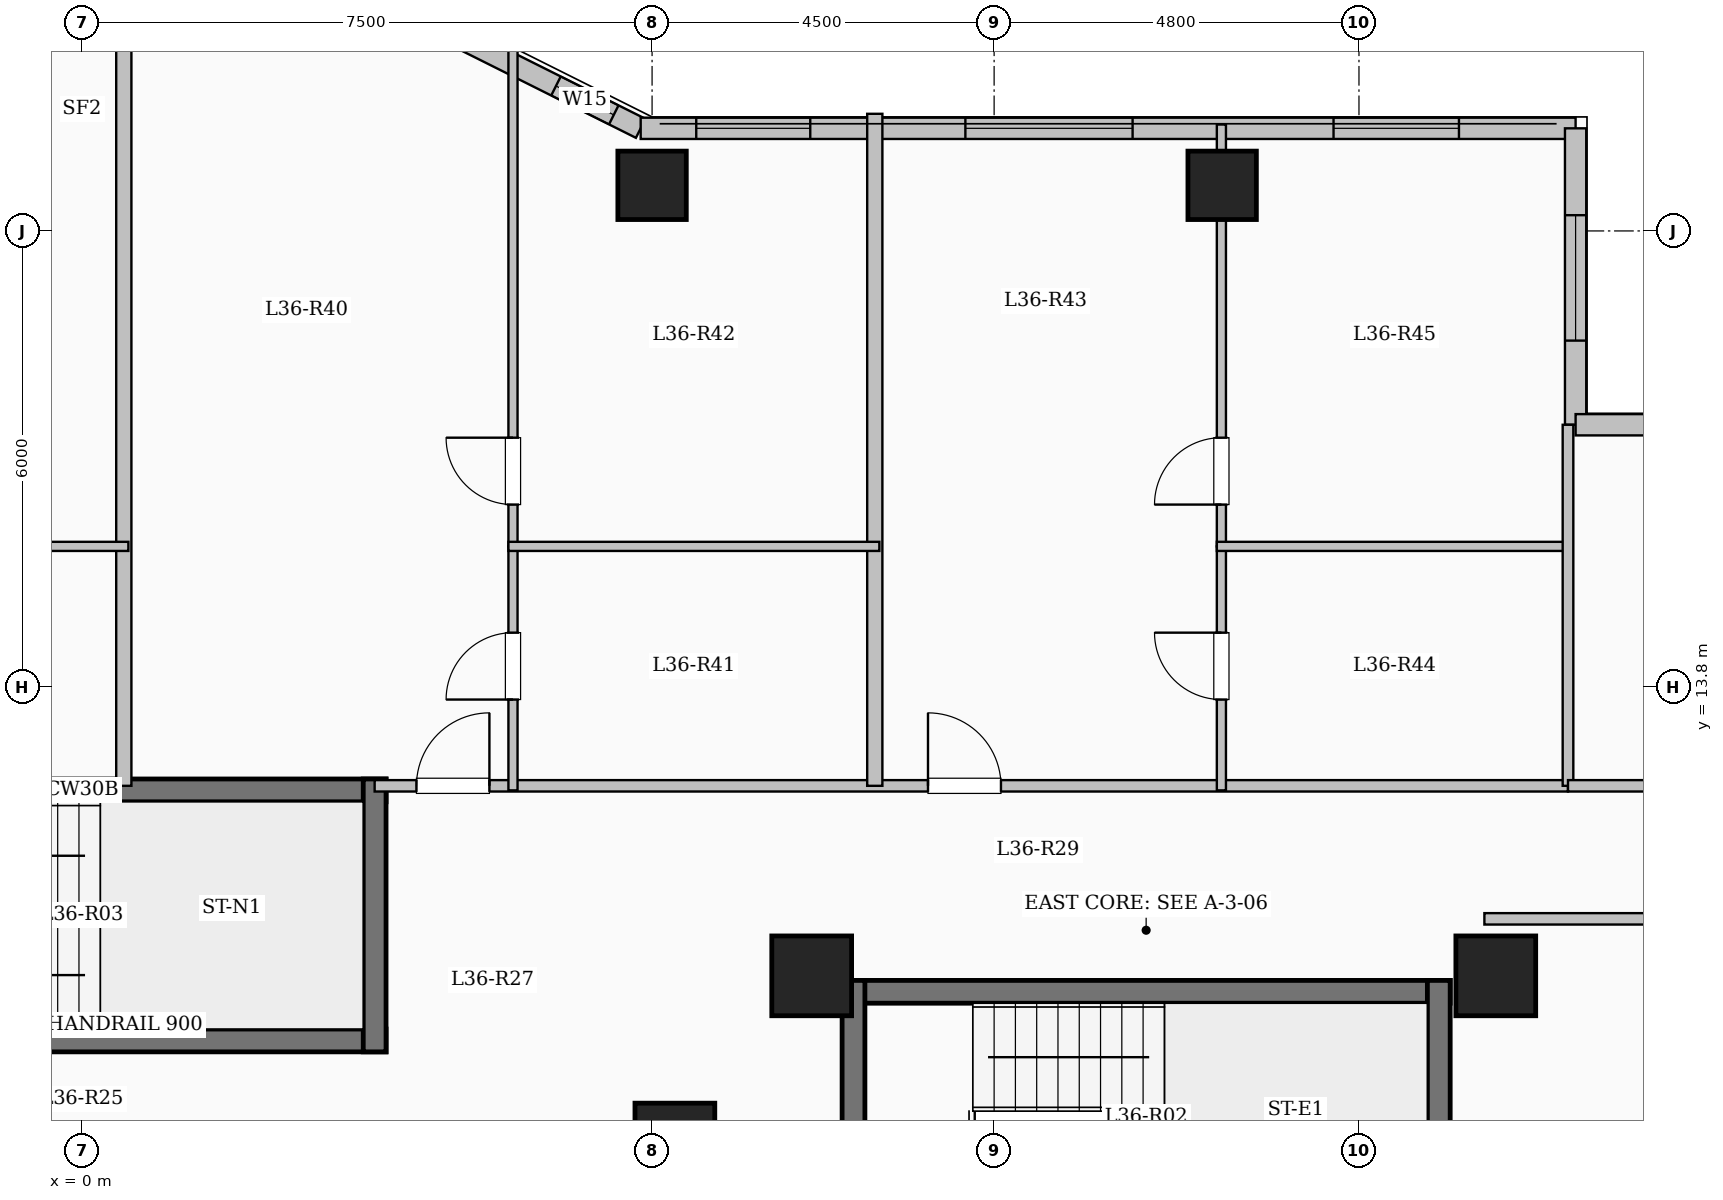
"""IFC4 building model, lengths in metres.
Left out: names, types, materials, properties, quantities, classifications, styles, units other than length and angle.
Written with IfcOpenShell. Run it as: python <this file> out.ifc"""

import sys

from ifc_helpers import new_model, si_unit, direction, frame, frame_2d, origin, origin_2d, place, context, subcontext, project, spatial, rectangle, extrude, element, fill, save


model = new_model("IFC4")
c1 = context("Model", 3, precision=1e-05, world=origin(), true_north=direction((0.0, 1.0)))
c2 = subcontext(c1, "Body", "Model", "MODEL_VIEW")
j1 = project(units=[si_unit("LENGTHUNIT", "METRE"), si_unit("PLANEANGLEUNIT", "RADIAN")], contexts=[c1])
p1 = place(None, origin())
s1 = spatial("IfcSite", under=j1, at=p1, CompositionType="ELEMENT")
p2 = place(p1, origin())
s2 = spatial("IfcBuilding", under=s1, at=p2, CompositionType="ELEMENT")
p3 = place(p2, frame((0.0, 0.0, 135.95)))
s3 = spatial("IfcBuildingStorey", under=s2, at=p3, CompositionType="ELEMENT", Elevation=135.95)
for number, where, z_axis, x_axis in (
    (1, (7.8, 7.8, 0.0), (0.0, 0.0, 1.0), (1.0, 0.0, 0.0)),
    (2, (9.6, 10.0, 0.0), (0.0, 0.0, 1.0), (1.0, 0.0, 0.0)),
    (3, (18.6, 10.0, 0.0), (0.0, 0.0, 1.0), (1.0, 0.0, 0.0)),
):
    element("IfcColumn", number, at=place(p3, frame(where, z_axis=z_axis, x_axis=x_axis)), inside=s3, PredefinedType="COLUMN", context=c2, shape_type="SweptSolid", body=[
        extrude(rectangle(XDim=1.05, YDim=1.05, at=origin_2d()), origin(), (0.0, 0.0, 1.0), 3.35),
    ])
for number, where, z_axis, x_axis in (
    (4, (7.5, 20.4, 0.0), (0.0, 0.0, 1.0), (1.0, 0.0, 0.0)),
    (5, (15.0, 20.4, 0.0), (0.0, 0.0, 1.0), (1.0, 0.0, 0.0)),
):
    element("IfcColumn", number, at=place(p3, frame(where, z_axis=z_axis, x_axis=x_axis)), inside=s3, PredefinedType="COLUMN", context=c2, shape_type="SweptSolid", body=[
        extrude(rectangle(XDim=0.9, YDim=0.9, at=origin_2d()), origin(), (0.0, 0.0, 1.0), 3.35),
    ])
p4 = place(p3, frame((4.35, 22.65, 0.0), z_axis=(0.0, 0.0, 1.0), x_axis=(0.894427191, -0.4472135955, 0.0)))
e6 = element("IfcWall", 6, at=p4, inside=s3, PredefinedType="SOLIDWALL", context=c2, shape_type="SweptSolid", body=[
    extrude(rectangle(XDim=3.354, YDim=0.28, at=frame_2d((1.677, 0.0))), origin(), (0.0, 0.0, 1.0), 3.1),
])
p5 = place(p4, frame((2.108, 0.0, 0.95)))
e7 = element("IfcOpeningElement", 7, at=p5, cuts=e6, PredefinedType="OPENING", context=c2, shape_type="SweptSolid", body=[
    extrude(rectangle(XDim=0.85, YDim=1.5, at=frame_2d((0.425, 0.75))), frame((0.0, 0.15, 0.0), z_axis=(0.0, -1.0, 0.0), x_axis=(1.0, 0.0, 0.0)), (0.0, 0.0, 1.0), 0.3),
])
p6 = place(p3, frame((7.35, 21.15, 0.0), z_axis=(0.0, 0.0, 1.0), x_axis=(1.0, 0.0, 0.0)))
e8 = element("IfcWall", 8, at=p6, inside=s3, PredefinedType="SOLIDWALL", context=c2, shape_type="SweptSolid", body=[
    extrude(rectangle(XDim=12.3, YDim=0.28, at=frame_2d((6.15, 0.0))), origin(), (0.0, 0.0, 1.0), 3.1),
])
p7 = place(p6, frame((0.731, 0.0, 0.9)))
e9 = element("IfcOpeningElement", 9, at=p7, cuts=e8, PredefinedType="OPENING", context=c2, shape_type="SweptSolid", body=[
    extrude(rectangle(XDim=1.5, YDim=1.65, at=frame_2d((0.75, 0.825))), frame((0.0, 0.15, 0.0), z_axis=(0.0, -1.0, 0.0), x_axis=(1.0, 0.0, 0.0)), (0.0, 0.0, 1.0), 0.3),
])
p8 = place(p6, frame((4.272, 0.0, 0.9)))
e10 = element("IfcOpeningElement", 10, at=p8, cuts=e8, PredefinedType="OPENING", context=c2, shape_type="SweptSolid", body=[
    extrude(rectangle(XDim=2.2, YDim=1.75, at=frame_2d((1.1, 0.875))), frame((0.0, 0.15, 0.0), z_axis=(0.0, -1.0, 0.0), x_axis=(1.0, 0.0, 0.0)), (0.0, 0.0, 1.0), 0.3),
])
p9 = place(p6, frame((9.115, 0.0, 0.9)))
e11 = element("IfcOpeningElement", 11, at=p9, cuts=e8, PredefinedType="OPENING", context=c2, shape_type="SweptSolid", body=[
    extrude(rectangle(XDim=1.65, YDim=1.6, at=frame_2d((0.825, 0.8))), frame((0.0, 0.15, 0.0), z_axis=(0.0, -1.0, 0.0), x_axis=(1.0, 0.0, 0.0)), (0.0, 0.0, 1.0), 0.3),
])
p10 = place(p3, frame((19.65, 21.15, 0.0), z_axis=(0.0, 0.0, 1.0), x_axis=(0.0, -1.0, 0.0)))
e12 = element("IfcWall", 12, at=p10, inside=s3, PredefinedType="SOLIDWALL", context=c2, shape_type="SweptSolid", body=[
    extrude(rectangle(XDim=3.9, YDim=0.28, at=frame_2d((1.95, 0.0))), origin(), (0.0, 0.0, 1.0), 3.1),
])
p11 = place(p10, frame((1.143, 0.0, 0.9)))
e13 = element("IfcOpeningElement", 13, at=p11, cuts=e12, PredefinedType="OPENING", context=c2, shape_type="SweptSolid", body=[
    extrude(rectangle(XDim=1.65, YDim=1.6, at=frame_2d((0.825, 0.8))), frame((0.0, 0.15, 0.0), z_axis=(0.0, -1.0, 0.0), x_axis=(1.0, 0.0, 0.0)), (0.0, 0.0, 1.0), 0.3),
])
p12 = place(p3, frame((19.65, 17.25, 0.0), z_axis=(0.0, 0.0, 1.0), x_axis=(1.0, 0.0, 0.0)))
e14 = element("IfcWall", 14, at=p12, inside=s3, PredefinedType="SOLIDWALL", context=c2, shape_type="SweptSolid", body=[
    extrude(rectangle(XDim=5.4, YDim=0.28, at=frame_2d((2.7, 0.0))), origin(), (0.0, 0.0, 1.0), 3.1),
])
p13 = place(p12, frame((1.675, 0.0, 0.9)))
e15 = element("IfcOpeningElement", 15, at=p13, cuts=e14, PredefinedType="OPENING", context=c2, shape_type="SweptSolid", body=[
    extrude(rectangle(XDim=2.0, YDim=1.7, at=frame_2d((1.0, 0.85))), frame((0.0, 0.15, 0.0), z_axis=(0.0, -1.0, 0.0), x_axis=(1.0, 0.0, 0.0)), (0.0, 0.0, 1.0), 0.3),
])
p14 = place(p3, frame((10.0, 9.79, 0.0), z_axis=(0.0, 0.0, 1.0), x_axis=(1.0, 0.0, 0.0)))
e16 = element("IfcWall", 16, at=p14, inside=s3, PredefinedType="SHEAR", context=c2, shape_type="SweptSolid", body=[
    extrude(rectangle(XDim=8.0, YDim=0.3, at=frame_2d((4.0, 0.0))), origin(), (0.0, 0.0, 1.0), 3.35),
])
for number, where, z_axis, x_axis in (
    (17, (10.15, 6.35, 0.0), (0.0, 0.0, 1.0), (0.0, 1.0, 0.0)),
    (18, (17.85, 6.35, 0.0), (0.0, 0.0, 1.0), (0.0, 1.0, 0.0)),
):
    element("IfcWall", number, at=place(p3, frame(where, z_axis=z_axis, x_axis=x_axis)), inside=s3, PredefinedType="SHEAR", context=c2, shape_type="SweptSolid", body=[
        extrude(rectangle(XDim=3.59, YDim=0.3, at=frame_2d((1.795, 0.0))), origin(), (0.0, 0.0, 1.0), 3.35),
    ])
p15 = place(p3, frame((-4.0, 12.44, 0.0), z_axis=(0.0, 0.0, 1.0), x_axis=(1.0, 0.0, 0.0)))
e19 = element("IfcWall", 19, at=p15, inside=s3, PredefinedType="SHEAR", context=c2, shape_type="SweptSolid", body=[
    extrude(rectangle(XDim=8.0, YDim=0.3, at=frame_2d((4.0, 0.0))), origin(), (0.0, 0.0, 1.0), 3.35),
])
p16 = place(p3, frame((-4.0, 9.15, 0.0), z_axis=(0.0, 0.0, 1.0), x_axis=(1.0, 0.0, 0.0)))
e20 = element("IfcWall", 20, at=p16, inside=s3, PredefinedType="SHEAR", context=c2, shape_type="SweptSolid", body=[
    extrude(rectangle(XDim=8.0, YDim=0.3, at=frame_2d((4.0, 0.0))), origin(), (0.0, 0.0, 1.0), 3.35),
])
p17 = place(p16, frame((0.55, 0.0, 0.0)))
e21 = element("IfcOpeningElement", 21, at=p17, cuts=e20, PredefinedType="OPENING", context=c2, shape_type="SweptSolid", body=[
    extrude(rectangle(XDim=1.0, YDim=2.15, at=frame_2d((0.5, 1.075))), frame((0.0, 0.16, 0.0), z_axis=(0.0, -1.0, 0.0), x_axis=(1.0, 0.0, 0.0)), (0.0, 0.0, 1.0), 0.32),
])
p18 = place(p3, frame((3.85, 9.0, 0.0), z_axis=(0.0, 0.0, 1.0), x_axis=(0.0, 1.0, 0.0)))
e22 = element("IfcWall", 22, at=p18, inside=s3, PredefinedType="SHEAR", context=c2, shape_type="SweptSolid", body=[
    extrude(rectangle(XDim=3.59, YDim=0.3, at=frame_2d((1.795, 0.0))), origin(), (0.0, 0.0, 1.0), 3.35),
])
p19 = place(p3, frame((3.85, 12.5, 0.0), z_axis=(0.0, 0.0, 1.0), x_axis=(1.0, 0.0, 0.0)))
e23 = element("IfcWall", 23, at=p19, inside=s3, PredefinedType="PARTITIONING", context=c2, shape_type="SweptSolid", body=[
    extrude(rectangle(XDim=15.7, YDim=0.15, at=frame_2d((7.85, 0.0))), origin(), (0.0, 0.0, 1.0), 3.1),
])
p20 = place(p19, frame((0.55, 0.0, 0.0)))
e24 = element("IfcOpeningElement", 24, at=p20, cuts=e23, PredefinedType="OPENING", context=c2, shape_type="SweptSolid", body=[
    extrude(rectangle(XDim=0.96, YDim=2.15, at=frame_2d((0.48, 1.075))), frame((0.0, 0.085, 0.0), z_axis=(0.0, -1.0, 0.0), x_axis=(1.0, 0.0, 0.0)), (0.0, 0.0, 1.0), 0.17),
])
p21 = place(p19, frame((7.28, 0.0, 0.0)))
e25 = element("IfcOpeningElement", 25, at=p21, cuts=e23, PredefinedType="OPENING", context=c2, shape_type="SweptSolid", body=[
    extrude(rectangle(XDim=0.96, YDim=2.15, at=frame_2d((0.48, 1.075))), frame((0.0, 0.085, 0.0), z_axis=(0.0, -1.0, 0.0), x_axis=(1.0, 0.0, 0.0)), (0.0, 0.0, 1.0), 0.17),
])
p22 = place(p3, frame((0.55, 12.5, 0.0), z_axis=(0.0, 0.0, 1.0), x_axis=(0.0, 1.0, 0.0)))
e26 = element("IfcWall", 26, at=p22, inside=s3, PredefinedType="SOLIDWALL", context=c2, shape_type="SweptSolid", body=[
    extrude(rectangle(XDim=10.18, YDim=0.2, at=frame_2d((5.09, 0.0))), origin(), (0.0, 0.0, 1.0), 3.1),
])
p23 = place(p3, frame((-4.27, 15.65, 0.0), z_axis=(0.0, 0.0, 1.0), x_axis=(1.0, 0.0, 0.0)))
e27 = element("IfcWall", 27, at=p23, inside=s3, PredefinedType="PARTITIONING", context=c2, shape_type="SweptSolid", body=[
    extrude(rectangle(XDim=4.88, YDim=0.12, at=frame_2d((2.44, 0.0))), origin(), (0.0, 0.0, 1.0), 2.685),
])
p24 = place(p3, frame((10.43, 12.5, 0.0), z_axis=(0.0, 0.0, 1.0), x_axis=(0.0, 1.0, 0.0)))
e28 = element("IfcWall", 28, at=p24, inside=s3, PredefinedType="SOLIDWALL", context=c2, shape_type="SweptSolid", body=[
    extrude(rectangle(XDim=8.841, YDim=0.2, at=frame_2d((4.42, 0.0))), origin(), (0.0, 0.0, 1.0), 3.1),
])
p25 = place(p3, frame((5.67, 12.44, 0.0), z_axis=(0.0, 0.0, 1.0), x_axis=(0.0, 1.0, 0.0)))
e29 = element("IfcWall", 29, at=p25, inside=s3, PredefinedType="PARTITIONING", context=c2, shape_type="SweptSolid", body=[
    extrude(rectangle(XDim=3.21, YDim=0.12, at=frame_2d((1.605, 0.0))), origin(), (0.0, 0.0, 1.0), 3.1),
])
p26 = place(p25, frame((1.195, 0.0, 0.0)))
e30 = element("IfcOpeningElement", 30, at=p26, cuts=e29, PredefinedType="OPENING", context=c2, shape_type="SweptSolid", body=[
    extrude(rectangle(XDim=0.88, YDim=2.1, at=frame_2d((0.44, 1.05))), frame((0.0, 0.07, 0.0), z_axis=(0.0, -1.0, 0.0), x_axis=(1.0, 0.0, 0.0)), (0.0, 0.0, 1.0), 0.14),
])
p27 = place(p3, frame((5.67, 15.65, 0.0), z_axis=(0.0, 0.0, 1.0), x_axis=(0.0, 1.0, 0.0)))
e31 = element("IfcWall", 31, at=p27, inside=s3, PredefinedType="PARTITIONING", context=c2, shape_type="SweptSolid", body=[
    extrude(rectangle(XDim=6.865, YDim=0.12, at=frame_2d((3.433, 0.0))), origin(), (0.0, 0.0, 1.0), 3.1),
])
p28 = place(p27, frame((0.55, 0.0, 0.0)))
e32 = element("IfcOpeningElement", 32, at=p28, cuts=e31, PredefinedType="OPENING", context=c2, shape_type="SweptSolid", body=[
    extrude(rectangle(XDim=0.88, YDim=2.1, at=frame_2d((0.44, 1.05))), frame((0.0, 0.07, 0.0), z_axis=(0.0, -1.0, 0.0), x_axis=(1.0, 0.0, 0.0)), (0.0, 0.0, 1.0), 0.14),
])
p29 = place(p3, frame((5.61, 15.65, 0.0), z_axis=(0.0, 0.0, 1.0), x_axis=(1.0, 0.0, 0.0)))
e33 = element("IfcWall", 33, at=p29, inside=s3, PredefinedType="PARTITIONING", context=c2, shape_type="SweptSolid", body=[
    extrude(rectangle(XDim=4.88, YDim=0.12, at=frame_2d((2.44, 0.0))), origin(), (0.0, 0.0, 1.0), 2.685),
])
p30 = place(p3, frame((14.99, 12.44, 0.0), z_axis=(0.0, 0.0, 1.0), x_axis=(0.0, 1.0, 0.0)))
e34 = element("IfcWall", 34, at=p30, inside=s3, PredefinedType="PARTITIONING", context=c2, shape_type="SweptSolid", body=[
    extrude(rectangle(XDim=3.21, YDim=0.12, at=frame_2d((1.605, 0.0))), origin(), (0.0, 0.0, 1.0), 2.585),
])
p31 = place(p30, frame((1.195, 0.0, 0.0)))
e35 = element("IfcOpeningElement", 35, at=p31, cuts=e34, PredefinedType="OPENING", context=c2, shape_type="SweptSolid", body=[
    extrude(rectangle(XDim=0.88, YDim=2.1, at=frame_2d((0.44, 1.05))), frame((0.0, 0.07, 0.0), z_axis=(0.0, -1.0, 0.0), x_axis=(1.0, 0.0, 0.0)), (0.0, 0.0, 1.0), 0.14),
])
p32 = place(p3, frame((14.99, 15.65, 0.0), z_axis=(0.0, 0.0, 1.0), x_axis=(0.0, 1.0, 0.0)))
e36 = element("IfcWall", 36, at=p32, inside=s3, PredefinedType="PARTITIONING", context=c2, shape_type="SweptSolid", body=[
    extrude(rectangle(XDim=5.55, YDim=0.12, at=frame_2d((2.775, 0.0))), origin(), (0.0, 0.0, 1.0), 2.585),
])
p33 = place(p32, frame((0.55, 0.0, 0.0)))
e37 = element("IfcOpeningElement", 37, at=p33, cuts=e36, PredefinedType="OPENING", context=c2, shape_type="SweptSolid", body=[
    extrude(rectangle(XDim=0.88, YDim=2.1, at=frame_2d((0.44, 1.05))), frame((0.0, 0.07, 0.0), z_axis=(0.0, -1.0, 0.0), x_axis=(1.0, 0.0, 0.0)), (0.0, 0.0, 1.0), 0.14),
])
p34 = place(p3, frame((14.93, 15.65, 0.0), z_axis=(0.0, 0.0, 1.0), x_axis=(1.0, 0.0, 0.0)))
e38 = element("IfcWall", 38, at=p34, inside=s3, PredefinedType="PARTITIONING", context=c2, shape_type="SweptSolid", body=[
    extrude(rectangle(XDim=4.68, YDim=0.12, at=frame_2d((2.34, 0.0))), origin(), (0.0, 0.0, 1.0), 3.1),
])
p35 = place(p3, frame((18.45, 10.75, 0.0), z_axis=(0.0, 0.0, 1.0), x_axis=(1.0, 0.0, 0.0)))
e39 = element("IfcWall", 39, at=p35, inside=s3, PredefinedType="PARTITIONING", context=c2, shape_type="SweptSolid", body=[
    extrude(rectangle(XDim=6.63, YDim=0.15, at=frame_2d((3.315, 0.0))), origin(), (0.0, 0.0, 1.0), 3.1),
])
p36 = place(p3, frame((19.55, 12.5, 0.0), z_axis=(0.0, 0.0, 1.0), x_axis=(0.0, 1.0, 0.0)))
e40 = element("IfcWall", 40, at=p36, inside=s3, PredefinedType="PARTITIONING", context=c2, shape_type="SweptSolid", body=[
    extrude(rectangle(XDim=4.75, YDim=0.14, at=frame_2d((2.375, 0.0))), origin(), (0.0, 0.0, 1.0), 3.1),
])
p37 = place(p3, frame((19.55, 12.5, 0.0), z_axis=(0.0, 0.0, 1.0), x_axis=(1.0, 0.0, 0.0)))
e41 = element("IfcWall", 41, at=p37, inside=s3, PredefinedType="PARTITIONING", context=c2, shape_type="SweptSolid", body=[
    extrude(rectangle(XDim=5.53, YDim=0.15, at=frame_2d((2.765, 0.0))), origin(), (0.0, 0.0, 1.0), 3.1),
])
p38 = place(p37, frame((2.29, 0.0, 0.0)))
e42 = element("IfcOpeningElement", 42, at=p38, cuts=e41, PredefinedType="OPENING", context=c2, shape_type="SweptSolid", body=[
    extrude(rectangle(XDim=0.95, YDim=2.15, at=frame_2d((0.475, 1.075))), frame((0.0, 0.085, 0.0), z_axis=(0.0, -1.0, 0.0), x_axis=(1.0, 0.0, 0.0)), (0.0, 0.0, 1.0), 0.17),
])
p39 = place(p5, origin())
e43 = element("IfcWindow", 43, at=p39, inside=s3, PartitioningType="SINGLE_PANEL", PredefinedType="WINDOW", context=c2, shape_type="SweptSolid", body=[
    extrude(rectangle(XDim=0.85, YDim=1.5, at=frame_2d((0.425, 0.75))), frame((0.0, 0.03, 0.0), z_axis=(0.0, -1.0, 0.0), x_axis=(1.0, 0.0, 0.0)), (0.0, 0.0, 1.0), 0.06),
])
fill(e7, e43)
p40 = place(p7, origin())
e44 = element("IfcWindow", 44, at=p40, inside=s3, PartitioningType="SINGLE_PANEL", PredefinedType="WINDOW", context=c2, shape_type="SweptSolid", body=[
    extrude(rectangle(XDim=1.5, YDim=1.65, at=frame_2d((0.75, 0.825))), frame((0.0, 0.03, 0.0), z_axis=(0.0, -1.0, 0.0), x_axis=(1.0, 0.0, 0.0)), (0.0, 0.0, 1.0), 0.06),
])
fill(e9, e44)
p41 = place(p8, origin())
e45 = element("IfcWindow", 45, at=p41, inside=s3, PartitioningType="SINGLE_PANEL", PredefinedType="WINDOW", context=c2, shape_type="SweptSolid", body=[
    extrude(rectangle(XDim=2.2, YDim=1.75, at=frame_2d((1.1, 0.875))), frame((0.0, 0.03, 0.0), z_axis=(0.0, -1.0, 0.0), x_axis=(1.0, 0.0, 0.0)), (0.0, 0.0, 1.0), 0.06),
])
fill(e10, e45)
p42 = place(p9, origin())
e46 = element("IfcWindow", 46, at=p42, inside=s3, PartitioningType="SINGLE_PANEL", PredefinedType="WINDOW", context=c2, shape_type="SweptSolid", body=[
    extrude(rectangle(XDim=1.65, YDim=1.6, at=frame_2d((0.825, 0.8))), frame((0.0, 0.03, 0.0), z_axis=(0.0, -1.0, 0.0), x_axis=(1.0, 0.0, 0.0)), (0.0, 0.0, 1.0), 0.06),
])
fill(e11, e46)
p43 = place(p11, origin())
e47 = element("IfcWindow", 47, at=p43, inside=s3, PartitioningType="SINGLE_PANEL", PredefinedType="WINDOW", context=c2, shape_type="SweptSolid", body=[
    extrude(rectangle(XDim=1.65, YDim=1.6, at=frame_2d((0.825, 0.8))), frame((0.0, 0.03, 0.0), z_axis=(0.0, -1.0, 0.0), x_axis=(1.0, 0.0, 0.0)), (0.0, 0.0, 1.0), 0.06),
])
fill(e13, e47)
p44 = place(p20, origin())
e48 = element("IfcDoor", 48, at=p44, inside=s3, OperationType="SINGLE_SWING_RIGHT", PredefinedType="DOOR", context=c2, shape_type="SweptSolid", body=[
    extrude(rectangle(XDim=0.96, YDim=2.15, at=frame_2d((0.48, 1.075))), frame((0.0, 0.025, 0.0), z_axis=(0.0, -1.0, 0.0), x_axis=(1.0, 0.0, 0.0)), (0.0, 0.0, 1.0), 0.05),
])
fill(e24, e48)
p45 = place(p26, origin())
e49 = element("IfcDoor", 49, at=p45, inside=s3, OperationType="SINGLE_SWING_LEFT", PredefinedType="DOOR", context=c2, shape_type="SweptSolid", body=[
    extrude(rectangle(XDim=0.88, YDim=2.1, at=frame_2d((0.44, 1.05))), frame((0.0, 0.025, 0.0), z_axis=(0.0, -1.0, 0.0), x_axis=(1.0, 0.0, 0.0)), (0.0, 0.0, 1.0), 0.05),
])
fill(e30, e49)
p46 = place(p28, origin())
e50 = element("IfcDoor", 50, at=p46, inside=s3, OperationType="SINGLE_SWING_RIGHT", PredefinedType="DOOR", context=c2, shape_type="SweptSolid", body=[
    extrude(rectangle(XDim=0.88, YDim=2.1, at=frame_2d((0.44, 1.05))), frame((0.0, 0.025, 0.0), z_axis=(0.0, -1.0, 0.0), x_axis=(1.0, 0.0, 0.0)), (0.0, 0.0, 1.0), 0.05),
])
fill(e32, e50)
p47 = place(p21, origin())
e51 = element("IfcDoor", 51, at=p47, inside=s3, OperationType="SINGLE_SWING_LEFT", PredefinedType="DOOR", context=c2, shape_type="SweptSolid", body=[
    extrude(rectangle(XDim=0.96, YDim=2.15, at=frame_2d((0.48, 1.075))), frame((0.0, 0.025, 0.0), z_axis=(0.0, -1.0, 0.0), x_axis=(1.0, 0.0, 0.0)), (0.0, 0.0, 1.0), 0.05),
])
fill(e25, e51)
p48 = place(p31, origin())
e52 = element("IfcDoor", 52, at=p48, inside=s3, OperationType="SINGLE_SWING_RIGHT", PredefinedType="DOOR", context=c2, shape_type="SweptSolid", body=[
    extrude(rectangle(XDim=0.88, YDim=2.1, at=frame_2d((0.44, 1.05))), frame((0.0, 0.025, 0.0), z_axis=(0.0, -1.0, 0.0), x_axis=(1.0, 0.0, 0.0)), (0.0, 0.0, 1.0), 0.05),
])
fill(e35, e52)
p49 = place(p33, origin())
e53 = element("IfcDoor", 53, at=p49, inside=s3, OperationType="SINGLE_SWING_LEFT", PredefinedType="DOOR", context=c2, shape_type="SweptSolid", body=[
    extrude(rectangle(XDim=0.88, YDim=2.1, at=frame_2d((0.44, 1.05))), frame((0.0, 0.025, 0.0), z_axis=(0.0, -1.0, 0.0), x_axis=(1.0, 0.0, 0.0)), (0.0, 0.0, 1.0), 0.05),
])
fill(e37, e53)
save(model, sys.argv[1])
